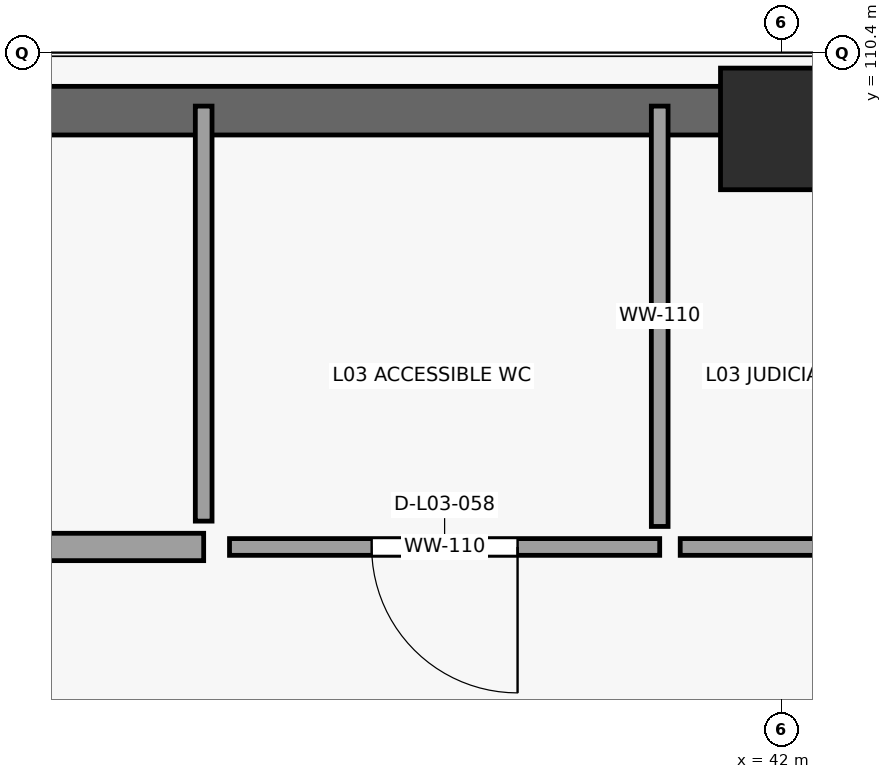
"""IFC4 building model, lengths in metres.
Left out: names, types, materials, properties, quantities, classifications, styles, units other than length and angle.
Written with IfcOpenShell. Run it as: python <this file> out.ifc"""

import sys

from ifc_helpers import new_model, si_unit, direction, frame, frame_2d, origin, origin_2d, place, context, subcontext, project, spatial, rectangle, extrude, element, fill, save


model = new_model("IFC4")
c1 = context("Model", 3, precision=1e-05, world=origin(), true_north=direction((0.0, 1.0)))
c2 = subcontext(c1, "Body", "Model", "MODEL_VIEW")
j1 = project(units=[si_unit("LENGTHUNIT", "METRE"), si_unit("PLANEANGLEUNIT", "RADIAN")], contexts=[c1])
p1 = place(None, origin())
s1 = spatial("IfcSite", under=j1, at=p1, CompositionType="ELEMENT")
p2 = place(p1, origin())
s2 = spatial("IfcBuilding", under=s1, at=p2, CompositionType="ELEMENT")
p3 = place(p2, frame((0.0, 0.0, 10.2)))
s3 = spatial("IfcBuildingStorey", under=s2, at=p3, CompositionType="ELEMENT", Elevation=10.2)
p4 = place(p3, frame((42.0, 109.9, 0.0), z_axis=(0.0, 0.0, 1.0), x_axis=(1.0, 0.0, 0.0)))
e1 = element("IfcColumn", 1, at=p4, inside=s3, PredefinedType="COLUMN", context=c2, shape_type="SweptSolid", body=[
    extrude(rectangle(XDim=0.85, YDim=0.85, at=origin_2d()), origin(), (0.0, 0.0, 1.0), 5.1),
])
p5 = place(p3, frame((33.6, 110.02, 0.0), z_axis=(0.0, 0.0, 1.0), x_axis=(1.0, 0.0, 0.0)))
e2 = element("IfcWall", 2, at=p5, inside=s3, PredefinedType="SOLIDWALL", context=c2, shape_type="SweptSolid", body=[
    extrude(rectangle(XDim=33.6, YDim=0.32, at=frame_2d((16.8, 0.0))), origin(), (0.0, 0.0, 1.0), 4.82),
])
p6 = place(p3, frame((38.2, 107.15, 0.0), z_axis=(0.0, 0.0, 1.0), x_axis=(-1.0, 0.0, 0.0)))
e3 = element("IfcWall", 3, at=p6, inside=s3, PredefinedType="PARTITIONING", context=c2, shape_type="SweptSolid", body=[
    extrude(rectangle(XDim=3.6, YDim=0.18, at=frame_2d((1.8, 0.0))), origin(), (0.0, 0.0, 1.0), 4.82),
])
p7 = place(p3, frame((41.2, 107.15, 0.0), z_axis=(0.0, 0.0, 1.0), x_axis=(-1.0, 0.0, 0.0)))
e4 = element("IfcWall", 4, at=p7, inside=s3, PredefinedType="PARTITIONING", context=c2, shape_type="SweptSolid", body=[
    extrude(rectangle(XDim=2.83, YDim=0.11, at=frame_2d((1.415, 0.0))), origin(), (0.0, 0.0, 1.0), 4.82),
])
p8 = place(p7, frame((0.935, 0.0, 0.0)))
e5 = element("IfcOpeningElement", 5, at=p8, cuts=e4, PredefinedType="OPENING", context=c2, shape_type="SweptSolid", body=[
    extrude(rectangle(XDim=0.96, YDim=2.14, at=frame_2d((0.48, 1.07))), frame((0.0, 0.065, 0.0), z_axis=(0.0, -1.0, 0.0), x_axis=(1.0, 0.0, 0.0)), (0.0, 0.0, 1.0), 0.13),
])
p9 = place(p3, frame((44.2, 107.15, 0.0), z_axis=(0.0, 0.0, 1.0), x_axis=(-1.0, 0.0, 0.0)))
e6 = element("IfcWall", 6, at=p9, inside=s3, PredefinedType="PARTITIONING", context=c2, shape_type="SweptSolid", body=[
    extrude(rectangle(XDim=2.865, YDim=0.11, at=frame_2d((1.433, 0.0))), origin(), (0.0, 0.0, 1.0), 4.82),
])
p10 = place(p9, frame((0.972, 0.0, 0.0)))
e7 = element("IfcOpeningElement", 7, at=p10, cuts=e6, PredefinedType="OPENING", context=c2, shape_type="SweptSolid", body=[
    extrude(rectangle(XDim=0.92, YDim=2.12, at=frame_2d((0.46, 1.06))), frame((0.0, 0.065, 0.0), z_axis=(0.0, -1.0, 0.0), x_axis=(1.0, 0.0, 0.0)), (0.0, 0.0, 1.0), 0.13),
])
p11 = place(p3, frame((41.2, 110.05, 0.0), z_axis=(0.0, 0.0, 1.0), x_axis=(0.0, -1.0, 0.0)))
e8 = element("IfcWall", 8, at=p11, inside=s3, PredefinedType="PARTITIONING", context=c2, shape_type="SweptSolid", body=[
    extrude(rectangle(XDim=2.765, YDim=0.11, at=frame_2d((1.383, 0.0))), origin(), (0.0, 0.0, 1.0), 4.82),
])
p12 = place(p3, frame((38.2, 107.32, 0.0), z_axis=(0.0, 0.0, 1.0), x_axis=(0.0, 1.0, 0.0)))
e9 = element("IfcWall", 9, at=p12, inside=s3, PredefinedType="PARTITIONING", context=c2, shape_type="SweptSolid", body=[
    extrude(rectangle(XDim=2.73, YDim=0.11, at=frame_2d((1.365, 0.0))), origin(), (0.0, 0.0, 1.0), 4.82),
])
p13 = place(p8, origin())
e10 = element("IfcDoor", 10, at=p13, inside=s3, OperationType="SINGLE_SWING_LEFT", PredefinedType="DOOR", context=c2, shape_type="SweptSolid", body=[
    extrude(rectangle(XDim=0.96, YDim=2.14, at=frame_2d((0.48, 1.07))), frame((0.0, 0.025, 0.0), z_axis=(0.0, -1.0, 0.0), x_axis=(1.0, 0.0, 0.0)), (0.0, 0.0, 1.0), 0.05),
])
fill(e5, e10)
save(model, sys.argv[1])
